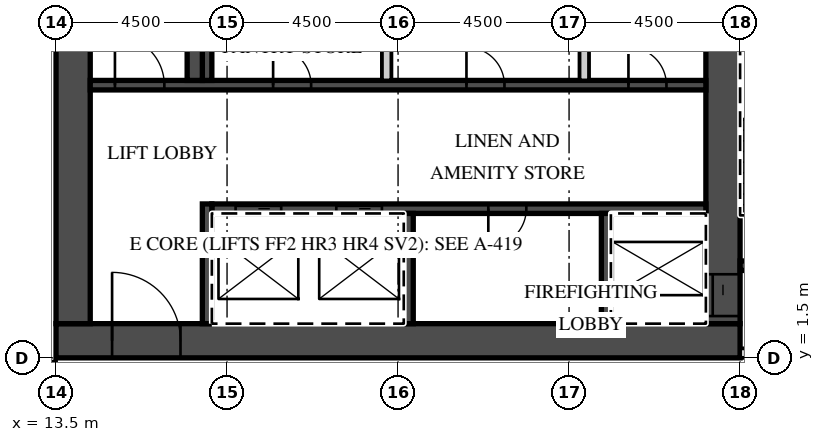
"""IFC4 building model, lengths in metres.
Left out: names, types, materials, properties, quantities, classifications, styles, units other than length and angle.
Written with IfcOpenShell. Run it as: python <this file> out.ifc"""

import sys

from ifc_helpers import new_model, si_unit, direction, frame, frame_2d, origin, place, context, subcontext, project, spatial, rectangle, extrude, element, fill, save


model = new_model("IFC4")
c1 = context("Model", 3, precision=1e-05, world=origin(), true_north=direction((0.0, 1.0)))
c2 = subcontext(c1, "Body", "Model", "MODEL_VIEW")
j1 = project(units=[si_unit("LENGTHUNIT", "METRE"), si_unit("PLANEANGLEUNIT", "RADIAN")], contexts=[c1])
p1 = place(None, origin())
s1 = spatial("IfcSite", under=j1, at=p1, CompositionType="ELEMENT")
p2 = place(p1, origin())
s2 = spatial("IfcBuilding", under=s1, at=p2, CompositionType="ELEMENT")
p3 = place(p2, frame((0.0, 0.0, 288.3)))
s3 = spatial("IfcBuildingStorey", under=s2, at=p3, CompositionType="ELEMENT", Elevation=288.3)
p4 = place(p3, frame((-39.909, 1.3, 0.0), z_axis=(0.0, 0.0, 1.0), x_axis=(1.0, 0.0, 0.0)))
e1 = element("IfcWall", 1, at=p4, inside=s3, PredefinedType="PARTITIONING", context=c2, shape_type="SweptSolid", body=[
    extrude(rectangle(XDim=53.409, YDim=0.2, at=frame_2d((26.705, 0.0))), origin(), (0.0, 0.0, 1.0), 3.02),
])
p5 = place(p4, frame((0.255, 0.0, 0.0)))
e2 = element("IfcOpeningElement", 2, at=p5, cuts=e1, PredefinedType="OPENING", context=c2, shape_type="SweptSolid", body=[
    extrude(rectangle(XDim=0.9, YDim=2.1, at=frame_2d((0.45, 1.05))), frame((0.0, 0.11, 0.0), z_axis=(0.0, -1.0, 0.0), x_axis=(1.0, 0.0, 0.0)), (0.0, 0.0, 1.0), 0.22),
])
p6 = place(p4, frame((6.347, 0.0, 0.0)))
e3 = element("IfcOpeningElement", 3, at=p6, cuts=e1, PredefinedType="OPENING", context=c2, shape_type="SweptSolid", body=[
    extrude(rectangle(XDim=1.2, YDim=2.1, at=frame_2d((0.6, 1.05))), frame((0.0, 0.11, 0.0), z_axis=(0.0, -1.0, 0.0), x_axis=(1.0, 0.0, 0.0)), (0.0, 0.0, 1.0), 0.22),
])
p7 = place(p4, frame((13.484, 0.0, 0.0)))
e4 = element("IfcOpeningElement", 4, at=p7, cuts=e1, PredefinedType="OPENING", context=c2, shape_type="SweptSolid", body=[
    extrude(rectangle(XDim=1.0, YDim=2.1, at=frame_2d((0.5, 1.05))), frame((0.0, 0.11, 0.0), z_axis=(0.0, -1.0, 0.0), x_axis=(1.0, 0.0, 0.0)), (0.0, 0.0, 1.0), 0.22),
])
p8 = place(p4, frame((20.334, 0.0, 0.0)))
e5 = element("IfcOpeningElement", 5, at=p8, cuts=e1, PredefinedType="OPENING", context=c2, shape_type="SweptSolid", body=[
    extrude(rectangle(XDim=1.0, YDim=2.1, at=frame_2d((0.5, 1.05))), frame((0.0, 0.11, 0.0), z_axis=(0.0, -1.0, 0.0), x_axis=(1.0, 0.0, 0.0)), (0.0, 0.0, 1.0), 0.22),
])
p9 = place(p4, frame((22.484, 0.0, 0.0)))
e6 = element("IfcOpeningElement", 6, at=p9, cuts=e1, PredefinedType="OPENING", context=c2, shape_type="SweptSolid", body=[
    extrude(rectangle(XDim=1.0, YDim=2.1, at=frame_2d((0.5, 1.05))), frame((0.0, 0.11, 0.0), z_axis=(0.0, -1.0, 0.0), x_axis=(1.0, 0.0, 0.0)), (0.0, 0.0, 1.0), 0.22),
])
p10 = place(p4, frame((26.959, 0.0, 0.0)))
e7 = element("IfcOpeningElement", 7, at=p10, cuts=e1, PredefinedType="OPENING", context=c2, shape_type="SweptSolid", body=[
    extrude(rectangle(XDim=1.0, YDim=2.1, at=frame_2d((0.5, 1.05))), frame((0.0, 0.11, 0.0), z_axis=(0.0, -1.0, 0.0), x_axis=(1.0, 0.0, 0.0)), (0.0, 0.0, 1.0), 0.22),
])
p11 = place(p4, frame((36.271, 0.0, 0.0)))
e8 = element("IfcOpeningElement", 8, at=p11, cuts=e1, PredefinedType="OPENING", context=c2, shape_type="SweptSolid", body=[
    extrude(rectangle(XDim=1.2, YDim=2.1, at=frame_2d((0.6, 1.05))), frame((0.0, 0.11, 0.0), z_axis=(0.0, -1.0, 0.0), x_axis=(1.0, 0.0, 0.0)), (0.0, 0.0, 1.0), 0.22),
])
p12 = place(p4, frame((40.484, 0.0, 0.0)))
e9 = element("IfcOpeningElement", 9, at=p12, cuts=e1, PredefinedType="OPENING", context=c2, shape_type="SweptSolid", body=[
    extrude(rectangle(XDim=1.0, YDim=2.1, at=frame_2d((0.5, 1.05))), frame((0.0, 0.11, 0.0), z_axis=(0.0, -1.0, 0.0), x_axis=(1.0, 0.0, 0.0)), (0.0, 0.0, 1.0), 0.22),
])
p13 = place(p4, frame((44.959, 0.0, 0.0)))
e10 = element("IfcOpeningElement", 10, at=p13, cuts=e1, PredefinedType="OPENING", context=c2, shape_type="SweptSolid", body=[
    extrude(rectangle(XDim=1.0, YDim=2.1, at=frame_2d((0.5, 1.05))), frame((0.0, 0.11, 0.0), z_axis=(0.0, -1.0, 0.0), x_axis=(1.0, 0.0, 0.0)), (0.0, 0.0, 1.0), 0.22),
])
p14 = place(p4, frame((51.834, 0.0, 0.0)))
e11 = element("IfcOpeningElement", 11, at=p14, cuts=e1, PredefinedType="OPENING", context=c2, shape_type="SweptSolid", body=[
    extrude(rectangle(XDim=1.0, YDim=2.1, at=frame_2d((0.5, 1.05))), frame((0.0, 0.11, 0.0), z_axis=(0.0, -1.0, 0.0), x_axis=(1.0, 0.0, 0.0)), (0.0, 0.0, 1.0), 0.22),
])
p15 = place(p3, frame((13.5, 1.95, 0.0), z_axis=(0.0, 0.0, 1.0), x_axis=(1.0, 0.0, 0.0)))
e12 = element("IfcWall", 12, at=p15, inside=s3, PredefinedType="SHEAR", context=c2, shape_type="SweptSolid", body=[
    extrude(rectangle(XDim=18.0, YDim=0.9, at=frame_2d((9.0, 0.0))), origin(), (0.0, 0.0, 1.0), 3.02),
])
p16 = place(p15, frame((1.475, 0.0, 0.0)))
e13 = element("IfcOpeningElement", 13, at=p16, cuts=e12, PredefinedType="OPENING", context=c2, shape_type="SweptSolid", body=[
    extrude(rectangle(XDim=1.8, YDim=2.1, at=frame_2d((0.9, 1.05))), frame((0.0, 0.46, 0.0), z_axis=(0.0, -1.0, 0.0), x_axis=(1.0, 0.0, 0.0)), (0.0, 0.0, 1.0), 0.92),
])
p17 = place(p3, frame((31.05, 2.4, 0.0), z_axis=(0.0, 0.0, 1.0), x_axis=(0.0, 1.0, 0.0)))
e14 = element("IfcWall", 14, at=p17, inside=s3, PredefinedType="SHEAR", context=c2, shape_type="SweptSolid", body=[
    extrude(rectangle(XDim=12.8, YDim=0.9, at=frame_2d((6.4, 0.0))), origin(), (0.0, 0.0, 1.0), 3.02),
])
p18 = place(p17, frame((0.2, 0.0, 0.0)))
e15 = element("IfcOpeningElement", 15, at=p18, cuts=e14, PredefinedType="OPENING", context=c2, shape_type="SweptSolid", body=[
    extrude(rectangle(XDim=1.1, YDim=2.1, at=frame_2d((0.55, 1.05))), frame((0.0, 0.46, 0.0), z_axis=(0.0, -1.0, 0.0), x_axis=(1.0, 0.0, 0.0)), (0.0, 0.0, 1.0), 0.92),
])
p19 = place(p3, frame((13.95, 2.4, 0.0), z_axis=(0.0, 0.0, 1.0), x_axis=(0.0, 1.0, 0.0)))
e16 = element("IfcWall", 16, at=p19, inside=s3, PredefinedType="SHEAR", context=c2, shape_type="SweptSolid", body=[
    extrude(rectangle(XDim=12.2, YDim=0.9, at=frame_2d((6.1, 0.0))), origin(), (0.0, 0.0, 1.0), 3.02),
])
p20 = place(p3, frame((17.6, 5.425, 0.0), z_axis=(0.0, 0.0, 1.0), x_axis=(1.0, 0.0, 0.0)))
e17 = element("IfcWall", 17, at=p20, inside=s3, PredefinedType="SHEAR", context=c2, shape_type="SweptSolid", body=[
    extrude(rectangle(XDim=13.0, YDim=0.25, at=frame_2d((6.5, 0.0))), origin(), (0.0, 0.0, 1.0), 3.02),
])
p21 = place(p20, frame((3.275, 0.0, 0.0)))
e18 = element("IfcOpeningElement", 18, at=p21, cuts=e17, PredefinedType="OPENING", context=c2, shape_type="SweptSolid", body=[
    extrude(rectangle(XDim=1.2, YDim=2.1, at=frame_2d((0.6, 1.05))), frame((0.0, 0.135, 0.0), z_axis=(0.0, -1.0, 0.0), x_axis=(1.0, 0.0, 0.0)), (0.0, 0.0, 1.0), 0.27),
])
p22 = place(p20, frame((0.625, 0.0, 0.0)))
e19 = element("IfcOpeningElement", 19, at=p22, cuts=e17, PredefinedType="OPENING", context=c2, shape_type="SweptSolid", body=[
    extrude(rectangle(XDim=1.2, YDim=2.1, at=frame_2d((0.6, 1.05))), frame((0.0, 0.135, 0.0), z_axis=(0.0, -1.0, 0.0), x_axis=(1.0, 0.0, 0.0)), (0.0, 0.0, 1.0), 0.27),
])
p23 = place(p20, frame((7.275, 0.0, 0.0)))
e20 = element("IfcOpeningElement", 20, at=p23, cuts=e17, PredefinedType="OPENING", context=c2, shape_type="SweptSolid", body=[
    extrude(rectangle(XDim=1.0, YDim=2.1, at=frame_2d((0.5, 1.05))), frame((0.0, 0.135, 0.0), z_axis=(0.0, -1.0, 0.0), x_axis=(1.0, 0.0, 0.0)), (0.0, 0.0, 1.0), 0.27),
])
p24 = place(p3, frame((17.475, 2.4, 0.0), z_axis=(0.0, 0.0, 1.0), x_axis=(0.0, 1.0, 0.0)))
e21 = element("IfcWall", 21, at=p24, inside=s3, PredefinedType="SHEAR", context=c2, shape_type="SweptSolid", body=[
    extrude(rectangle(XDim=3.15, YDim=0.25, at=frame_2d((1.575, 0.0))), origin(), (0.0, 0.0, 1.0), 3.02),
])
for number, where, z_axis, x_axis in (
    (22, (27.975, 2.4, 0.0), (0.0, 0.0, 1.0), (0.0, 1.0, 0.0)),
    (23, (22.775, 2.4, 0.0), (0.0, 0.0, 1.0), (0.0, 1.0, 0.0)),
):
    element("IfcWall", number, at=place(p3, frame(where, z_axis=z_axis, x_axis=x_axis)), inside=s3, PredefinedType="SHEAR", context=c2, shape_type="SweptSolid", body=[
        extrude(rectangle(XDim=2.9, YDim=0.25, at=frame_2d((1.45, 0.0))), origin(), (0.0, 0.0, 1.0), 3.02),
    ])
p25 = place(p3, frame((14.4, 8.675, 0.0), z_axis=(0.0, 0.0, 1.0), x_axis=(1.0, 0.0, 0.0)))
e24 = element("IfcWall", 24, at=p25, inside=s3, PredefinedType="SHEAR", context=c2, shape_type="SweptSolid", body=[
    extrude(rectangle(XDim=16.2, YDim=0.25, at=frame_2d((8.1, 0.0))), origin(), (0.0, 0.0, 1.0), 3.02),
])
p26 = place(p25, frame((0.65, 0.0, 0.0)))
e25 = element("IfcOpeningElement", 25, at=p26, cuts=e24, PredefinedType="OPENING", context=c2, shape_type="SweptSolid", body=[
    extrude(rectangle(XDim=1.3, YDim=2.1, at=frame_2d((0.65, 1.05))), frame((0.0, 0.135, 0.0), z_axis=(0.0, -1.0, 0.0), x_axis=(1.0, 0.0, 0.0)), (0.0, 0.0, 1.0), 0.27),
])
p27 = place(p25, frame((14.163, 0.0, 0.0)))
e26 = element("IfcOpeningElement", 26, at=p27, cuts=e24, PredefinedType="OPENING", context=c2, shape_type="SweptSolid", body=[
    extrude(rectangle(XDim=1.0, YDim=2.1, at=frame_2d((0.5, 1.05))), frame((0.0, 0.135, 0.0), z_axis=(0.0, -1.0, 0.0), x_axis=(1.0, 0.0, 0.0)), (0.0, 0.0, 1.0), 0.27),
])
p28 = place(p25, frame((9.9, 0.0, 0.0)))
e27 = element("IfcOpeningElement", 27, at=p28, cuts=e24, PredefinedType="OPENING", context=c2, shape_type="SweptSolid", body=[
    extrude(rectangle(XDim=1.0, YDim=2.1, at=frame_2d((0.5, 1.05))), frame((0.0, 0.135, 0.0), z_axis=(0.0, -1.0, 0.0), x_axis=(1.0, 0.0, 0.0)), (0.0, 0.0, 1.0), 0.27),
])
p29 = place(p25, frame((4.812, 0.0, 0.0)))
e28 = element("IfcOpeningElement", 28, at=p29, cuts=e24, PredefinedType="OPENING", context=c2, shape_type="SweptSolid", body=[
    extrude(rectangle(XDim=1.0, YDim=2.1, at=frame_2d((0.5, 1.05))), frame((0.0, 0.135, 0.0), z_axis=(0.0, -1.0, 0.0), x_axis=(1.0, 0.0, 0.0)), (0.0, 0.0, 1.0), 0.27),
])
p30 = place(p3, frame((17.475, 8.8, 0.0), z_axis=(0.0, 0.0, 1.0), x_axis=(0.0, 1.0, 0.0)))
e29 = element("IfcWall", 29, at=p30, inside=s3, PredefinedType="SHEAR", context=c2, shape_type="SweptSolid", body=[
    extrude(rectangle(XDim=2.9, YDim=0.25, at=frame_2d((1.45, 0.0))), origin(), (0.0, 0.0, 1.0), 3.02),
])
for number, where, z_axis, x_axis in (
    (30, (27.4, 8.8, 0.0), (0.0, 0.0, 1.0), (0.0, 1.0, 0.0)),
    (31, (22.2, 8.8, 0.0), (0.0, 0.0, 1.0), (0.0, 1.0, 0.0)),
):
    element("IfcWall", number, at=place(p3, frame(where, z_axis=z_axis, x_axis=x_axis)), inside=s3, PredefinedType="PARTITIONING", context=c2, shape_type="SweptSolid", body=[
        extrude(rectangle(XDim=2.9, YDim=0.25, at=frame_2d((1.45, 0.0))), origin(), (0.0, 0.0, 1.0), 3.02),
    ])
p31 = place(p3, frame((17.15, 8.8, 0.0), z_axis=(0.0, 0.0, 1.0), x_axis=(0.0, 1.0, 0.0)))
e32 = element("IfcWall", 32, at=p31, inside=s3, PredefinedType="SHEAR", context=c2, shape_type="SweptSolid", body=[
    extrude(rectangle(XDim=5.8, YDim=0.4, at=frame_2d((2.9, 0.0))), origin(), (0.0, 0.0, 1.0), 3.02),
])
p32 = place(p3, frame((31.5, 1.625, 0.0), z_axis=(0.0, 0.0, 1.0), x_axis=(1.0, 0.0, 0.0)))
e33 = element("IfcWall", 33, at=p32, inside=s3, PredefinedType="PARTITIONING", context=c2, shape_type="SweptSolid", body=[
    extrude(rectangle(XDim=5.012, YDim=0.25, at=frame_2d((2.506, 0.0))), origin(), (0.0, 0.0, 1.0), 3.02),
])
p33 = place(p32, frame((0.625, 0.0, 0.0)))
e34 = element("IfcOpeningElement", 34, at=p33, cuts=e33, PredefinedType="OPENING", context=c2, shape_type="SweptSolid", body=[
    extrude(rectangle(XDim=1.3, YDim=2.1, at=frame_2d((0.65, 1.05))), frame((0.0, 0.135, 0.0), z_axis=(0.0, -1.0, 0.0), x_axis=(1.0, 0.0, 0.0)), (0.0, 0.0, 1.0), 0.27),
])
p34 = place(p32, frame((3.25, 0.0, 0.0)))
e35 = element("IfcOpeningElement", 35, at=p34, cuts=e33, PredefinedType="OPENING", context=c2, shape_type="SweptSolid", body=[
    extrude(rectangle(XDim=1.1, YDim=2.1, at=frame_2d((0.55, 1.05))), frame((0.0, 0.135, 0.0), z_axis=(0.0, -1.0, 0.0), x_axis=(1.0, 0.0, 0.0)), (0.0, 0.0, 1.0), 0.27),
])
p35 = place(p3, frame((31.5, 3.925, 0.0), z_axis=(0.0, 0.0, 1.0), x_axis=(1.0, 0.0, 0.0)))
e36 = element("IfcWall", 36, at=p35, inside=s3, PredefinedType="SHEAR", context=c2, shape_type="SweptSolid", body=[
    extrude(rectangle(XDim=2.55, YDim=0.25, at=frame_2d((1.275, 0.0))), origin(), (0.0, 0.0, 1.0), 3.02),
])
p36 = place(p35, frame((0.625, 0.0, 0.0)))
e37 = element("IfcOpeningElement", 37, at=p36, cuts=e36, PredefinedType="OPENING", context=c2, shape_type="SweptSolid", body=[
    extrude(rectangle(XDim=1.3, YDim=2.1, at=frame_2d((0.65, 1.05))), frame((0.0, 0.135, 0.0), z_axis=(0.0, -1.0, 0.0), x_axis=(1.0, 0.0, 0.0)), (0.0, 0.0, 1.0), 0.27),
])
p37 = place(p21, origin())
e38 = element("IfcDoor", 38, at=p37, inside=s3, OperationType="SLIDING_TO_RIGHT", PredefinedType="DOOR", context=c2, shape_type="SweptSolid", body=[
    extrude(rectangle(XDim=1.2, YDim=2.1, at=frame_2d((0.6, 1.05))), frame((0.0, 0.025, 0.0), z_axis=(0.0, -1.0, 0.0), x_axis=(1.0, 0.0, 0.0)), (0.0, 0.0, 1.0), 0.05),
])
fill(e18, e38)
p38 = place(p22, origin())
e39 = element("IfcDoor", 39, at=p38, inside=s3, OperationType="SLIDING_TO_LEFT", PredefinedType="DOOR", context=c2, shape_type="SweptSolid", body=[
    extrude(rectangle(XDim=1.2, YDim=2.1, at=frame_2d((0.6, 1.05))), frame((0.0, 0.025, 0.0), z_axis=(0.0, -1.0, 0.0), x_axis=(1.0, 0.0, 0.0)), (0.0, 0.0, 1.0), 0.05),
])
fill(e19, e39)
p39 = place(p18, origin())
e40 = element("IfcDoor", 40, at=p39, inside=s3, OperationType="SLIDING_TO_LEFT", PredefinedType="DOOR", context=c2, shape_type="SweptSolid", body=[
    extrude(rectangle(XDim=1.1, YDim=2.1, at=frame_2d((0.55, 1.05))), frame((0.0, 0.025, 0.0), z_axis=(0.0, -1.0, 0.0), x_axis=(1.0, 0.0, 0.0)), (0.0, 0.0, 1.0), 0.05),
])
fill(e15, e40)
p40 = place(p16, origin())
e41 = element("IfcDoor", 41, at=p40, inside=s3, OperationType="DOUBLE_DOOR_DOUBLE_SWING", PredefinedType="DOOR", context=c2, shape_type="SweptSolid", body=[
    extrude(rectangle(XDim=1.8, YDim=2.1, at=frame_2d((0.9, 1.05))), frame((0.0, 0.025, 0.0), z_axis=(0.0, -1.0, 0.0), x_axis=(1.0, 0.0, 0.0)), (0.0, 0.0, 1.0), 0.05),
])
fill(e13, e41)
p41 = place(p26, origin())
e42 = element("IfcDoor", 42, at=p41, inside=s3, OperationType="SINGLE_SWING_LEFT", PredefinedType="DOOR", context=c2, shape_type="SweptSolid", body=[
    extrude(rectangle(XDim=1.3, YDim=2.1, at=frame_2d((0.65, 1.05))), frame((0.0, 0.025, 0.0), z_axis=(0.0, -1.0, 0.0), x_axis=(1.0, 0.0, 0.0)), (0.0, 0.0, 1.0), 0.05),
])
fill(e25, e42)
p42 = place(p27, origin())
e43 = element("IfcDoor", 43, at=p42, inside=s3, OperationType="SINGLE_SWING_LEFT", PredefinedType="DOOR", context=c2, shape_type="SweptSolid", body=[
    extrude(rectangle(XDim=1.0, YDim=2.1, at=frame_2d((0.5, 1.05))), frame((0.0, 0.025, 0.0), z_axis=(0.0, -1.0, 0.0), x_axis=(1.0, 0.0, 0.0)), (0.0, 0.0, 1.0), 0.05),
])
fill(e26, e43)
p43 = place(p28, origin())
e44 = element("IfcDoor", 44, at=p43, inside=s3, OperationType="SINGLE_SWING_LEFT", PredefinedType="DOOR", context=c2, shape_type="SweptSolid", body=[
    extrude(rectangle(XDim=1.0, YDim=2.1, at=frame_2d((0.5, 1.05))), frame((0.0, 0.025, 0.0), z_axis=(0.0, -1.0, 0.0), x_axis=(1.0, 0.0, 0.0)), (0.0, 0.0, 1.0), 0.05),
])
fill(e27, e44)
p44 = place(p29, origin())
e45 = element("IfcDoor", 45, at=p44, inside=s3, OperationType="SINGLE_SWING_LEFT", PredefinedType="DOOR", context=c2, shape_type="SweptSolid", body=[
    extrude(rectangle(XDim=1.0, YDim=2.1, at=frame_2d((0.5, 1.05))), frame((0.0, 0.025, 0.0), z_axis=(0.0, -1.0, 0.0), x_axis=(1.0, 0.0, 0.0)), (0.0, 0.0, 1.0), 0.05),
])
fill(e28, e45)
p45 = place(p23, origin())
e46 = element("IfcDoor", 46, at=p45, inside=s3, OperationType="SINGLE_SWING_LEFT", PredefinedType="DOOR", context=c2, shape_type="SweptSolid", body=[
    extrude(rectangle(XDim=1.0, YDim=2.1, at=frame_2d((0.5, 1.05))), frame((0.0, 0.025, 0.0), z_axis=(0.0, -1.0, 0.0), x_axis=(1.0, 0.0, 0.0)), (0.0, 0.0, 1.0), 0.05),
])
fill(e20, e46)
save(model, sys.argv[1])
